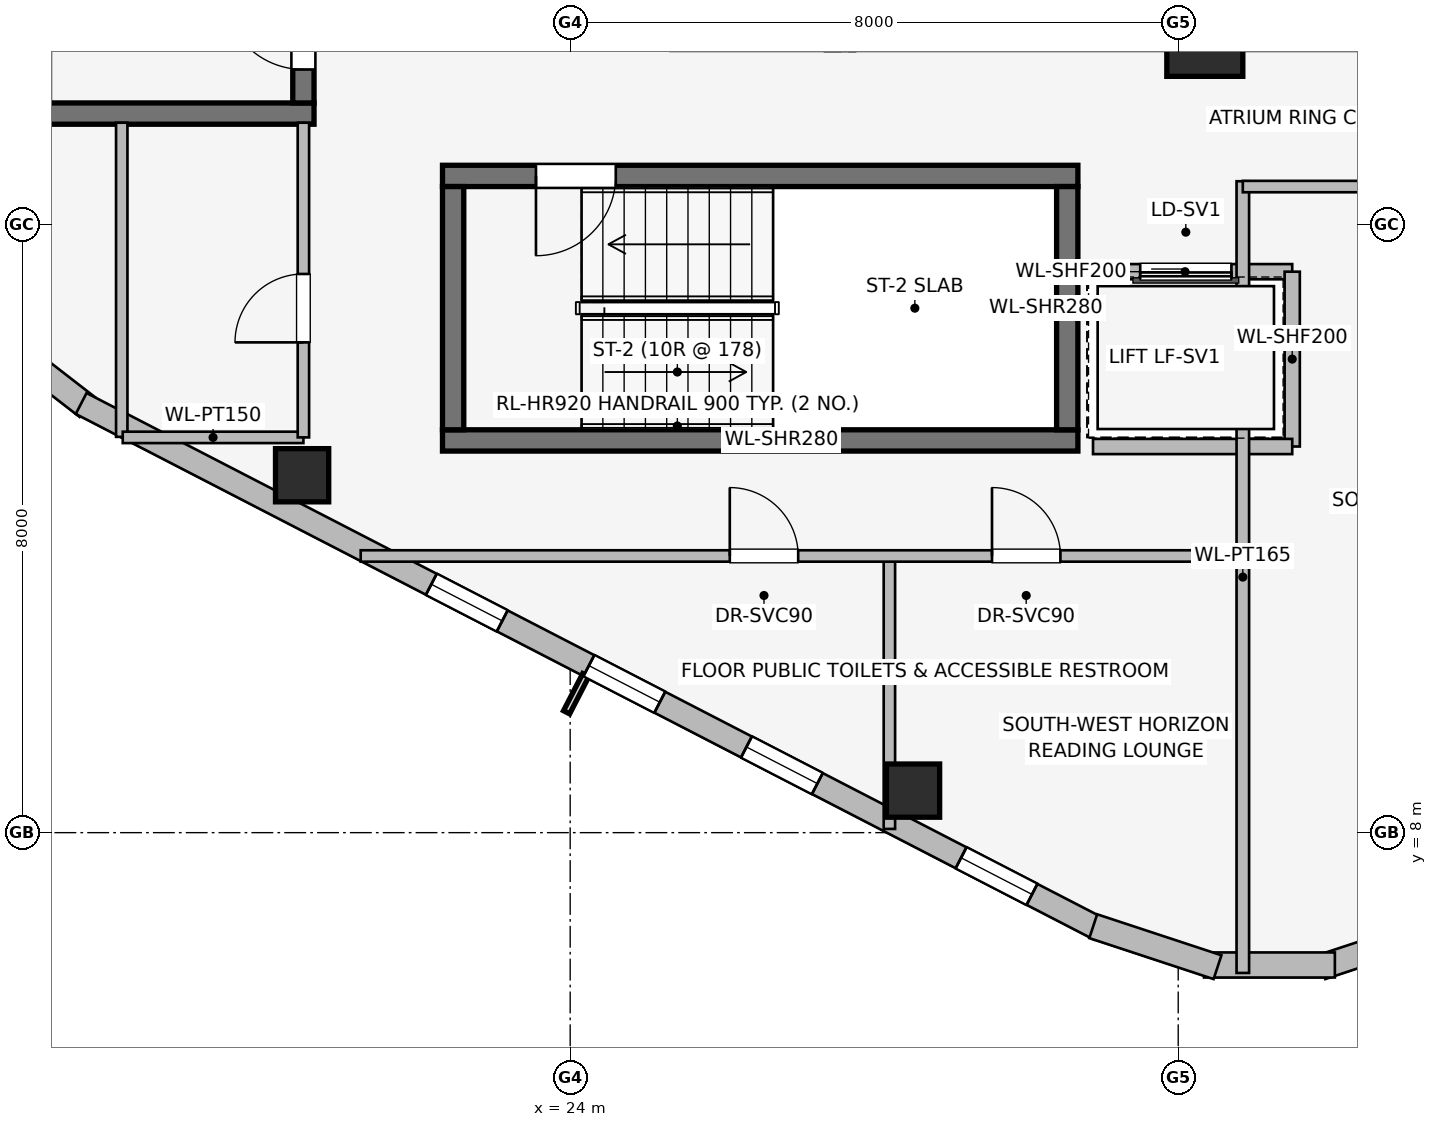
"""IFC4 building model, lengths in metres.
Left out: names, types, materials, properties, quantities, classifications, styles, units other than length and angle.
Written with IfcOpenShell. Run it as: python <this file> out.ifc"""

import sys

from ifc_helpers import new_model, si_unit, direction, frame, frame_2d, origin, origin_2d, place, context, subcontext, project, spatial, rectangle, extrude, element, fill, save


model = new_model("IFC4")
c1 = context("Model", 3, precision=1e-05, world=origin(), true_north=direction((0.0, 1.0)))
c2 = subcontext(c1, "Body", "Model", "MODEL_VIEW")
j1 = project(units=[si_unit("LENGTHUNIT", "METRE"), si_unit("PLANEANGLEUNIT", "RADIAN")], contexts=[c1])
p1 = place(None, origin())
s1 = spatial("IfcSite", under=j1, at=p1, CompositionType="ELEMENT")
p2 = place(p1, origin())
s2 = spatial("IfcBuilding", under=s1, at=p2, CompositionType="ELEMENT")
p3 = place(p2, frame((0.0, 0.0, 263.2)))
s3 = spatial("IfcBuildingStorey", under=s2, at=p3, CompositionType="ELEMENT", Elevation=263.2)
p4 = place(p3, frame((16.87, 17.46, 0.0), z_axis=(0.0, 0.0, 1.0), x_axis=(1.0, 0.0, 0.0)))
e1 = element("IfcWall", 1, at=p4, inside=s3, PredefinedType="SHEAR", context=c2, shape_type="SweptSolid", body=[
    extrude(rectangle(XDim=3.76, YDim=0.28, at=frame_2d((1.88, 0.0))), origin(), (0.0, 0.0, 1.0), 3.55),
])
p5 = place(p3, frame((20.49, 17.6, 0.0), z_axis=(0.0, 0.0, 1.0), x_axis=(0.0, 1.0, 0.0)))
e2 = element("IfcWall", 2, at=p5, inside=s3, PredefinedType="SHEAR", context=c2, shape_type="SweptSolid", body=[
    extrude(rectangle(XDim=7.8, YDim=0.28, at=frame_2d((3.9, 0.0))), origin(), (0.0, 0.0, 1.0), 3.55),
])
p6 = place(p5, frame((0.44, 0.0, 0.0)))
e3 = element("IfcOpeningElement", 3, at=p6, cuts=e2, PredefinedType="OPENING", context=c2, shape_type="SweptSolid", body=[
    extrude(rectangle(XDim=1.05, YDim=2.0, at=frame_2d((0.525, 1.0))), frame((0.0, 0.15, 0.0), z_axis=(0.0, -1.0, 0.0), x_axis=(1.0, 0.0, 0.0)), (0.0, 0.0, 1.0), 0.3),
])
p7 = place(p3, frame((22.32, 13.16, 0.0), z_axis=(0.0, 0.0, 1.0), x_axis=(1.0, 0.0, 0.0)))
e4 = element("IfcWall", 4, at=p7, inside=s3, PredefinedType="SHEAR", context=c2, shape_type="SweptSolid", body=[
    extrude(rectangle(XDim=8.36, YDim=0.28, at=frame_2d((4.18, 0.0))), origin(), (0.0, 0.0, 1.0), 3.55),
])
p8 = place(p3, frame((30.68, 16.64, 0.0), z_axis=(0.0, 0.0, 1.0), x_axis=(-1.0, 0.0, 0.0)))
e5 = element("IfcWall", 5, at=p8, inside=s3, PredefinedType="SHEAR", context=c2, shape_type="SweptSolid", body=[
    extrude(rectangle(XDim=8.36, YDim=0.28, at=frame_2d((4.18, 0.0))), origin(), (0.0, 0.0, 1.0), 3.55),
])
p9 = place(p8, frame((6.08, 0.0, 0.0)))
e6 = element("IfcOpeningElement", 6, at=p9, cuts=e5, PredefinedType="OPENING", context=c2, shape_type="SweptSolid", body=[
    extrude(rectangle(XDim=1.05, YDim=2.0, at=frame_2d((0.525, 1.0))), frame((0.0, 0.15, 0.0), z_axis=(0.0, -1.0, 0.0), x_axis=(1.0, 0.0, 0.0)), (0.0, 0.0, 1.0), 0.3),
])
for number, where, z_axis, x_axis in (
    (7, (22.46, 16.5, 0.0), (0.0, 0.0, 1.0), (0.0, -1.0, 0.0)),
    (8, (30.54, 13.3, 0.0), (0.0, 0.0, 1.0), (0.0, 1.0, 0.0)),
):
    element("IfcWall", number, at=place(p3, frame(where, z_axis=z_axis, x_axis=x_axis)), inside=s3, PredefinedType="SHEAR", context=c2, shape_type="SweptSolid", body=[
        extrude(rectangle(XDim=3.2, YDim=0.28, at=frame_2d((1.6, 0.0))), origin(), (0.0, 0.0, 1.0), 3.55),
    ])
p10 = place(p3, frame((32.35, 18.45, 0.0), z_axis=(0.0, 0.0, 1.0), x_axis=(1.0, 0.0, 0.0)))
e9 = element("IfcColumn", 9, at=p10, inside=s3, PredefinedType="COLUMN", context=c2, shape_type="SweptSolid", body=[
    extrude(rectangle(XDim=1.0, YDim=1.0, at=origin_2d()), origin(), (0.0, 0.0, 1.0), 3.55),
])
for number, where, z_axis, x_axis in (
    (10, (20.473, 12.702, 0.0), (0.0, 0.0, 1.0), (1.0, 0.0, 0.0)),
    (11, (28.511, 8.553, 0.0), (0.0, 0.0, 1.0), (1.0, 0.0, 0.0)),
):
    element("IfcColumn", number, at=place(p3, frame(where, z_axis=z_axis, x_axis=x_axis)), inside=s3, PredefinedType="COLUMN", context=c2, shape_type="SweptSolid", body=[
        extrude(rectangle(XDim=0.7, YDim=0.7, at=origin_2d()), origin(), (0.0, 0.0, 1.0), 3.55),
    ])
p11 = place(p3, frame((17.647, 13.599, 0.0), z_axis=(0.0, 0.0, 1.0), x_axis=(-0.790691856293, 0.61221433207, 0.0)))
e12 = element("IfcWall", 12, at=p11, inside=s3, PredefinedType="STANDARD", context=c2, shape_type="SweptSolid", body=[
    extrude(rectangle(XDim=1.676, YDim=0.33, at=frame_2d((0.838, 0.0))), origin(), (0.0, 0.0, 1.0), 3.29),
])
p12 = place(p3, frame((30.963, 6.73, 0.0), z_axis=(0.0, 0.0, 1.0), x_axis=(-0.888581481622, 0.458718814218, 0.0)))
e13 = element("IfcWall", 13, at=p12, inside=s3, PredefinedType="STANDARD", context=c2, shape_type="SweptSolid", body=[
    extrude(rectangle(XDim=15.077, YDim=0.31, at=frame_2d((7.539, 0.0))), origin(), (0.0, 0.0, 1.0), 3.29),
])
p13 = place(p12, frame((0.998, 0.0, 0.75)))
e14 = element("IfcOpeningElement", 14, at=p13, cuts=e13, PredefinedType="OPENING", context=c2, shape_type="SweptSolid", body=[
    extrude(rectangle(XDim=1.05, YDim=1.4, at=frame_2d((0.525, 0.7))), frame((0.0, 0.165, 0.0), z_axis=(0.0, -1.0, 0.0), x_axis=(1.0, 0.0, 0.0)), (0.0, 0.0, 1.0), 0.33),
])
p14 = place(p12, frame((4.176, 0.0, 0.75)))
e15 = element("IfcOpeningElement", 15, at=p14, cuts=e13, PredefinedType="OPENING", context=c2, shape_type="SweptSolid", body=[
    extrude(rectangle(XDim=1.05, YDim=1.4, at=frame_2d((0.525, 0.7))), frame((0.0, 0.165, 0.0), z_axis=(0.0, -1.0, 0.0), x_axis=(1.0, 0.0, 0.0)), (0.0, 0.0, 1.0), 0.33),
])
p15 = place(p12, frame((6.509, 0.0, 0.75)))
e16 = element("IfcOpeningElement", 16, at=p15, cuts=e13, PredefinedType="OPENING", context=c2, shape_type="SweptSolid", body=[
    extrude(rectangle(XDim=1.05, YDim=1.4, at=frame_2d((0.525, 0.7))), frame((0.0, 0.165, 0.0), z_axis=(0.0, -1.0, 0.0), x_axis=(1.0, 0.0, 0.0)), (0.0, 0.0, 1.0), 0.33),
])
p16 = place(p12, frame((8.842, 0.0, 0.75)))
e17 = element("IfcOpeningElement", 17, at=p16, cuts=e13, PredefinedType="OPENING", context=c2, shape_type="SweptSolid", body=[
    extrude(rectangle(XDim=1.05, YDim=1.4, at=frame_2d((0.525, 0.7))), frame((0.0, 0.165, 0.0), z_axis=(0.0, -1.0, 0.0), x_axis=(1.0, 0.0, 0.0)), (0.0, 0.0, 1.0), 0.33),
])
p17 = place(p3, frame((35.518, 6.769, 0.0), z_axis=(0.0, 0.0, 1.0), x_axis=(-0.949713440491, -0.313120393699, 0.0)))
e18 = element("IfcWall", 18, at=p17, inside=s3, PredefinedType="STANDARD", context=c2, shape_type="SweptSolid", body=[
    extrude(rectangle(XDim=1.722, YDim=0.33, at=frame_2d((0.861, 0.0))), origin(), (0.0, 0.0, 1.0), 3.29),
])
p18 = place(p3, frame((34.061, 6.259, 0.0), z_axis=(0.0, 0.0, 1.0), x_axis=(-1.0, 0.0, 0.0)))
e19 = element("IfcWall", 19, at=p18, inside=s3, PredefinedType="STANDARD", context=c2, shape_type="SweptSolid", body=[
    extrude(rectangle(XDim=1.722, YDim=0.33, at=frame_2d((0.861, 0.0))), origin(), (0.0, 0.0, 1.0), 3.29),
])
p19 = place(p3, frame((32.517, 6.23, 0.0), z_axis=(0.0, 0.0, 1.0), x_axis=(-0.949713440491, 0.313120393699, 0.0)))
e20 = element("IfcWall", 20, at=p19, inside=s3, PredefinedType="STANDARD", context=c2, shape_type="SweptSolid", body=[
    extrude(rectangle(XDim=1.722, YDim=0.33, at=frame_2d((0.861, 0.0))), origin(), (0.0, 0.0, 1.0), 3.29),
])
p20 = place(p3, frame((33.5, 15.38, 0.0), z_axis=(0.0, 0.0, 1.0), x_axis=(-1.0, 0.0, 0.0)))
e21 = element("IfcWall", 21, at=p20, inside=s3, PredefinedType="PARTITIONING", context=c2, shape_type="SweptSolid", body=[
    extrude(rectangle(XDim=2.82, YDim=0.2, at=frame_2d((1.41, 0.0))), origin(), (0.0, 0.0, 1.0), 3.29),
])
p21 = place(p20, frame((0.8, 0.0, 0.0)))
e22 = element("IfcOpeningElement", 22, at=p21, cuts=e21, PredefinedType="OPENING", context=c2, shape_type="SweptSolid", body=[
    extrude(rectangle(XDim=1.2, YDim=2.2, at=frame_2d((0.6, 1.1))), frame((0.0, 0.11, 0.0), z_axis=(0.0, -1.0, 0.0), x_axis=(1.0, 0.0, 0.0)), (0.0, 0.0, 1.0), 0.22),
])
p22 = place(p3, frame((33.5, 13.08, 0.0), z_axis=(0.0, 0.0, 1.0), x_axis=(0.0, 1.0, 0.0)))
e23 = element("IfcWall", 23, at=p22, inside=s3, PredefinedType="PARTITIONING", context=c2, shape_type="SweptSolid", body=[
    extrude(rectangle(XDim=2.3, YDim=0.2, at=frame_2d((1.15, 0.0))), origin(), (0.0, 0.0, 1.0), 3.29),
])
p23 = place(p3, frame((30.879, 13.08, 0.0), z_axis=(0.0, 0.0, 1.0), x_axis=(1.0, 0.0, 0.0)))
e24 = element("IfcWall", 24, at=p23, inside=s3, PredefinedType="PARTITIONING", context=c2, shape_type="SweptSolid", body=[
    extrude(rectangle(XDim=2.621, YDim=0.2, at=frame_2d((1.311, 0.0))), origin(), (0.0, 0.0, 1.0), 3.29),
])
p24 = place(p3, frame((18.1, 17.34, 0.0), z_axis=(0.0, 0.0, 1.0), x_axis=(0.0, -1.0, 0.0)))
e25 = element("IfcWall", 25, at=p24, inside=s3, PredefinedType="PARTITIONING", context=c2, shape_type="SweptSolid", body=[
    extrude(rectangle(XDim=4.133, YDim=0.15, at=frame_2d((2.066, 0.0))), origin(), (0.0, 0.0, 1.0), 3.29),
])
p25 = place(p3, frame((18.113, 13.2, 0.0), z_axis=(0.0, 0.0, 1.0), x_axis=(1.0, 0.0, 0.0)))
e26 = element("IfcWall", 26, at=p25, inside=s3, PredefinedType="PARTITIONING", context=c2, shape_type="SweptSolid", body=[
    extrude(rectangle(XDim=2.377, YDim=0.15, at=frame_2d((1.188, 0.0))), origin(), (0.0, 0.0, 1.0), 3.29),
])
p26 = place(p3, frame((20.49, 13.2, 0.0), z_axis=(0.0, 0.0, 1.0), x_axis=(0.0, 1.0, 0.0)))
e27 = element("IfcWall", 27, at=p26, inside=s3, PredefinedType="PARTITIONING", context=c2, shape_type="SweptSolid", body=[
    extrude(rectangle(XDim=4.14, YDim=0.15, at=frame_2d((2.07, 0.0))), origin(), (0.0, 0.0, 1.0), 3.29),
])
p27 = place(p26, frame((1.25, 0.0, 0.0)))
e28 = element("IfcOpeningElement", 28, at=p27, cuts=e27, PredefinedType="OPENING", context=c2, shape_type="SweptSolid", body=[
    extrude(rectangle(XDim=0.9, YDim=2.0, at=frame_2d((0.45, 1.0))), frame((0.0, 0.085, 0.0), z_axis=(0.0, -1.0, 0.0), x_axis=(1.0, 0.0, 0.0)), (0.0, 0.0, 1.0), 0.17),
])
p28 = place(p3, frame((32.85, 6.154, 0.0), z_axis=(0.0, 0.0, 1.0), x_axis=(0.0, 1.0, 0.0)))
e29 = element("IfcWall", 29, at=p28, inside=s3, PredefinedType="PARTITIONING", context=c2, shape_type="SweptSolid", body=[
    extrude(rectangle(XDim=10.416, YDim=0.165, at=frame_2d((5.208, 0.0))), origin(), (0.0, 0.0, 1.0), 3.29),
])
p29 = place(p3, frame((28.2, 8.049, 0.0), z_axis=(0.0, 0.0, 1.0), x_axis=(0.0, 1.0, 0.0)))
e30 = element("IfcWall", 30, at=p29, inside=s3, PredefinedType="PARTITIONING", context=c2, shape_type="SweptSolid", body=[
    extrude(rectangle(XDim=3.591, YDim=0.15, at=frame_2d((1.795, 0.0))), origin(), (0.0, 0.0, 1.0), 3.29),
])
p30 = place(p3, frame((21.244, 11.64, 0.0), z_axis=(0.0, 0.0, 1.0), x_axis=(1.0, 0.0, 0.0)))
e31 = element("IfcWall", 31, at=p30, inside=s3, PredefinedType="PARTITIONING", context=c2, shape_type="SweptSolid", body=[
    extrude(rectangle(XDim=11.606, YDim=0.15, at=frame_2d((5.803, 0.0))), origin(), (0.0, 0.0, 1.0), 2.833),
])
p31 = place(p30, frame((4.856, 0.0, 0.0)))
e32 = element("IfcOpeningElement", 32, at=p31, cuts=e31, PredefinedType="OPENING", context=c2, shape_type="SweptSolid", body=[
    extrude(rectangle(XDim=0.9, YDim=2.0, at=frame_2d((0.45, 1.0))), frame((0.0, 0.085, 0.0), z_axis=(0.0, -1.0, 0.0), x_axis=(1.0, 0.0, 0.0)), (0.0, 0.0, 1.0), 0.17),
])
p32 = place(p30, frame((8.306, 0.0, 0.0)))
e33 = element("IfcOpeningElement", 33, at=p32, cuts=e31, PredefinedType="OPENING", context=c2, shape_type="SweptSolid", body=[
    extrude(rectangle(XDim=0.9, YDim=2.0, at=frame_2d((0.45, 1.0))), frame((0.0, 0.085, 0.0), z_axis=(0.0, -1.0, 0.0), x_axis=(1.0, 0.0, 0.0)), (0.0, 0.0, 1.0), 0.17),
])
p33 = place(p3, frame((32.85, 16.5, 0.0), z_axis=(0.0, 0.0, 1.0), x_axis=(1.0, 0.0, 0.0)))
e34 = element("IfcWall", 34, at=p33, inside=s3, PredefinedType="PARTITIONING", context=c2, shape_type="SweptSolid", body=[
    extrude(rectangle(XDim=8.61, YDim=0.15, at=frame_2d((4.305, 0.0))), origin(), (0.0, 0.0, 1.0), 3.29),
])
p34 = place(p33, frame((3.825, 0.0, 0.0)))
e35 = element("IfcOpeningElement", 35, at=p34, cuts=e34, PredefinedType="OPENING", context=c2, shape_type="SweptSolid", body=[
    extrude(rectangle(XDim=0.96, YDim=2.0, at=frame_2d((0.48, 1.0))), frame((0.0, 0.085, 0.0), z_axis=(0.0, -1.0, 0.0), x_axis=(1.0, 0.0, 0.0)), (0.0, 0.0, 1.0), 0.17),
])
p35 = place(p13, origin())
e36 = element("IfcWindow", 36, at=p35, inside=s3, PartitioningType="SINGLE_PANEL", PredefinedType="WINDOW", context=c2, shape_type="SweptSolid", body=[
    extrude(rectangle(XDim=1.05, YDim=1.4, at=frame_2d((0.525, 0.7))), frame((0.0, 0.03, 0.0), z_axis=(0.0, -1.0, 0.0), x_axis=(1.0, 0.0, 0.0)), (0.0, 0.0, 1.0), 0.06),
])
fill(e14, e36)
p36 = place(p14, origin())
e37 = element("IfcWindow", 37, at=p36, inside=s3, PartitioningType="SINGLE_PANEL", PredefinedType="WINDOW", context=c2, shape_type="SweptSolid", body=[
    extrude(rectangle(XDim=1.05, YDim=1.4, at=frame_2d((0.525, 0.7))), frame((0.0, 0.03, 0.0), z_axis=(0.0, -1.0, 0.0), x_axis=(1.0, 0.0, 0.0)), (0.0, 0.0, 1.0), 0.06),
])
fill(e15, e37)
p37 = place(p15, origin())
e38 = element("IfcWindow", 38, at=p37, inside=s3, PartitioningType="SINGLE_PANEL", PredefinedType="WINDOW", context=c2, shape_type="SweptSolid", body=[
    extrude(rectangle(XDim=1.05, YDim=1.4, at=frame_2d((0.525, 0.7))), frame((0.0, 0.03, 0.0), z_axis=(0.0, -1.0, 0.0), x_axis=(1.0, 0.0, 0.0)), (0.0, 0.0, 1.0), 0.06),
])
fill(e16, e38)
p38 = place(p16, origin())
e39 = element("IfcWindow", 39, at=p38, inside=s3, PartitioningType="SINGLE_PANEL", PredefinedType="WINDOW", context=c2, shape_type="SweptSolid", body=[
    extrude(rectangle(XDim=1.05, YDim=1.4, at=frame_2d((0.525, 0.7))), frame((0.0, 0.03, 0.0), z_axis=(0.0, -1.0, 0.0), x_axis=(1.0, 0.0, 0.0)), (0.0, 0.0, 1.0), 0.06),
])
fill(e17, e39)
p39 = place(p6, origin())
e40 = element("IfcDoor", 40, at=p39, inside=s3, OperationType="SINGLE_SWING_RIGHT", PredefinedType="DOOR", context=c2, shape_type="SweptSolid", body=[
    extrude(rectangle(XDim=1.05, YDim=2.0, at=frame_2d((0.525, 1.0))), frame((0.0, 0.025, 0.0), z_axis=(0.0, -1.0, 0.0), x_axis=(1.0, 0.0, 0.0)), (0.0, 0.0, 1.0), 0.05),
])
fill(e3, e40)
p40 = place(p9, origin())
e41 = element("IfcDoor", 41, at=p40, inside=s3, OperationType="SINGLE_SWING_RIGHT", PredefinedType="DOOR", context=c2, shape_type="SweptSolid", body=[
    extrude(rectangle(XDim=1.05, YDim=2.0, at=frame_2d((0.525, 1.0))), frame((0.0, 0.025, 0.0), z_axis=(0.0, -1.0, 0.0), x_axis=(1.0, 0.0, 0.0)), (0.0, 0.0, 1.0), 0.05),
])
fill(e6, e41)
p41 = place(p21, origin())
e42 = element("IfcDoor", 42, at=p41, inside=s3, OperationType="SLIDING_TO_RIGHT", PredefinedType="DOOR", context=c2, shape_type="SweptSolid", body=[
    extrude(rectangle(XDim=1.2, YDim=2.2, at=frame_2d((0.6, 1.1))), frame((0.0, 0.025, 0.0), z_axis=(0.0, -1.0, 0.0), x_axis=(1.0, 0.0, 0.0)), (0.0, 0.0, 1.0), 0.05),
])
fill(e22, e42)
p42 = place(p27, origin())
e43 = element("IfcDoor", 43, at=p42, inside=s3, OperationType="SINGLE_SWING_LEFT", PredefinedType="DOOR", context=c2, shape_type="SweptSolid", body=[
    extrude(rectangle(XDim=0.9, YDim=2.0, at=frame_2d((0.45, 1.0))), frame((0.0, 0.025, 0.0), z_axis=(0.0, -1.0, 0.0), x_axis=(1.0, 0.0, 0.0)), (0.0, 0.0, 1.0), 0.05),
])
fill(e28, e43)
p43 = place(p31, origin())
e44 = element("IfcDoor", 44, at=p43, inside=s3, OperationType="SINGLE_SWING_LEFT", PredefinedType="DOOR", context=c2, shape_type="SweptSolid", body=[
    extrude(rectangle(XDim=0.9, YDim=2.0, at=frame_2d((0.45, 1.0))), frame((0.0, 0.025, 0.0), z_axis=(0.0, -1.0, 0.0), x_axis=(1.0, 0.0, 0.0)), (0.0, 0.0, 1.0), 0.05),
])
fill(e32, e44)
p44 = place(p32, origin())
e45 = element("IfcDoor", 45, at=p44, inside=s3, OperationType="SINGLE_SWING_LEFT", PredefinedType="DOOR", context=c2, shape_type="SweptSolid", body=[
    extrude(rectangle(XDim=0.9, YDim=2.0, at=frame_2d((0.45, 1.0))), frame((0.0, 0.025, 0.0), z_axis=(0.0, -1.0, 0.0), x_axis=(1.0, 0.0, 0.0)), (0.0, 0.0, 1.0), 0.05),
])
fill(e33, e45)
save(model, sys.argv[1])
